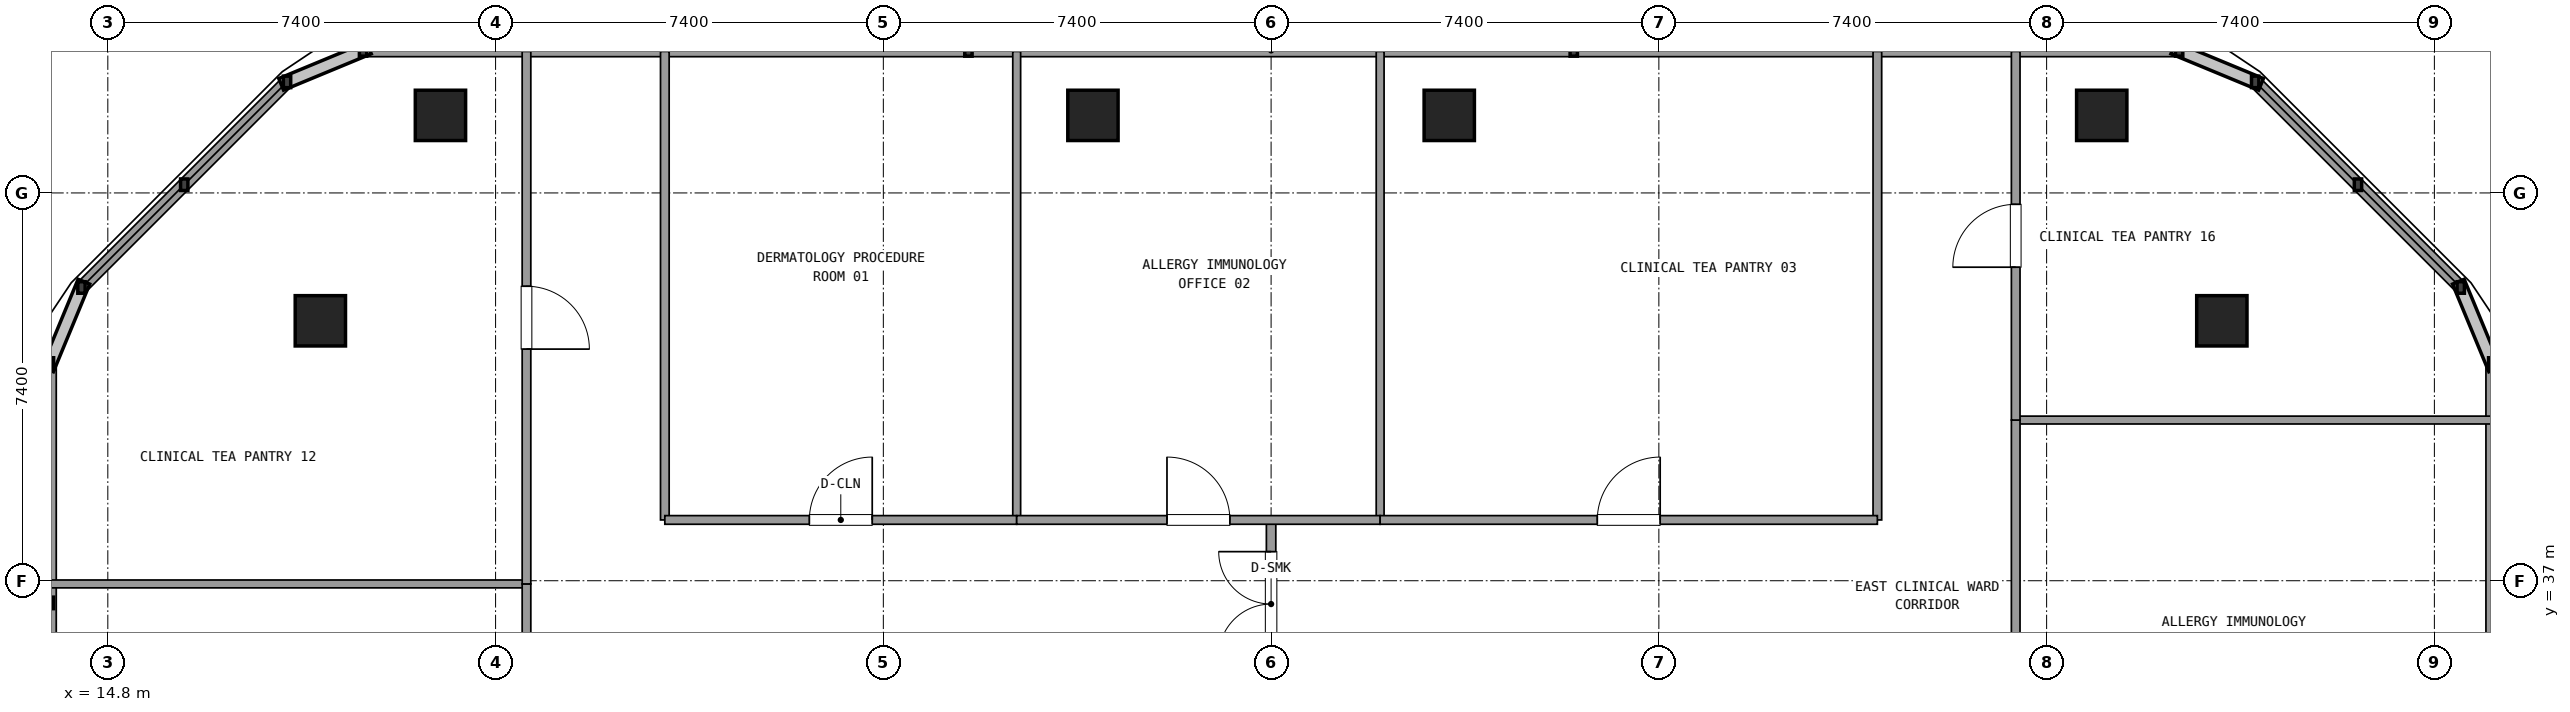
"""IFC4 building model, lengths in metres.
Left out: names, types, materials, properties, quantities, classifications, styles, units other than length and angle.
Written with IfcOpenShell. Run it as: python <this file> out.ifc"""

import sys

from ifc_helpers import new_model, si_unit, direction, frame, frame_2d, origin, origin_2d, place, context, subcontext, project, spatial, rectangle, extrude, element, fill, save


model = new_model("IFC4")
c1 = context("Model", 3, precision=1e-05, world=origin(), true_north=direction((0.0, 1.0)))
c2 = subcontext(c1, "Body", "Model", "MODEL_VIEW")
j1 = project(units=[si_unit("LENGTHUNIT", "METRE"), si_unit("PLANEANGLEUNIT", "RADIAN")], contexts=[c1])
p1 = place(None, origin())
s1 = spatial("IfcSite", under=j1, at=p1, CompositionType="ELEMENT")
p2 = place(p1, origin())
s2 = spatial("IfcBuilding", under=s1, at=p2, CompositionType="ELEMENT")
p3 = place(p2, frame((0.0, 0.0, 149.22)))
s3 = spatial("IfcBuildingStorey", under=s2, at=p3, CompositionType="ELEMENT", Elevation=149.22)
for number, where, z_axis, x_axis in (
    (1, (55.144, 41.96, 0.0), (0.0, 0.0, 1.0), (1.0, 0.0, 0.0)),
    (2, (52.852, 45.88, 0.0), (0.0, 0.0, 1.0), (1.0, 0.0, 0.0)),
    (3, (40.4, 45.88, 0.0), (0.0, 0.0, 1.0), (1.0, 0.0, 0.0)),
    (4, (33.6, 45.88, 0.0), (0.0, 0.0, 1.0), (1.0, 0.0, 0.0)),
    (5, (21.148, 45.88, 0.0), (0.0, 0.0, 1.0), (1.0, 0.0, 0.0)),
    (6, (18.856, 41.96, 0.0), (0.0, 0.0, 1.0), (1.0, 0.0, 0.0)),
):
    element("IfcColumn", number, at=place(p3, frame(where, z_axis=z_axis, x_axis=x_axis)), inside=s3, PredefinedType="COLUMN", context=c2, shape_type="SweptSolid", body=[
        extrude(rectangle(XDim=0.96, YDim=0.96, at=origin_2d()), origin(), (0.0, 0.0, 1.0), 3.6),
    ])
p4 = place(p3, frame((60.304, 10.655, 0.0), z_axis=(0.0, 0.0, 1.0), x_axis=(0.0, 1.0, 0.0)))
e7 = element("IfcWall", 7, at=p4, inside=s3, PredefinedType="SOLIDWALL", context=c2, shape_type="SweptSolid", body=[
    extrude(rectangle(XDim=30.49, YDim=0.24, at=frame_2d((15.245, 0.0))), origin(), (0.0, 0.0, 1.0), 0.85),
])
p5 = place(p3, frame((59.703, 42.596, 0.0), z_axis=(0.0, 0.0, 1.0), x_axis=(-0.707084777957, 0.707128783731, 0.0)))
e8 = element("IfcWall", 8, at=p5, inside=s3, PredefinedType="SOLIDWALL", context=c2, shape_type="SweptSolid", body=[
    extrude(rectangle(XDim=5.548, YDim=0.24, at=frame_2d((2.774, 0.0))), origin(), (0.0, 0.0, 1.0), 0.85),
])
p6 = place(p3, frame((54.329, 47.12, 0.0), z_axis=(0.0, 0.0, 1.0), x_axis=(-1.0, 0.0, 0.0)))
e9 = element("IfcWall", 9, at=p6, inside=s3, PredefinedType="SOLIDWALL", context=c2, shape_type="SweptSolid", body=[
    extrude(rectangle(XDim=34.658, YDim=0.24, at=frame_2d((17.329, 0.0))), origin(), (0.0, 0.0, 1.0), 0.85),
])
p7 = place(p3, frame((18.22, 46.519, 0.0), z_axis=(0.0, 0.0, 1.0), x_axis=(-0.707084777957, -0.707128783731, 0.0)))
e10 = element("IfcWall", 10, at=p7, inside=s3, PredefinedType="SOLIDWALL", context=c2, shape_type="SweptSolid", body=[
    extrude(rectangle(XDim=5.548, YDim=0.24, at=frame_2d((2.774, 0.0))), origin(), (0.0, 0.0, 1.0), 0.85),
])
p8 = place(p3, frame((13.696, 41.145, 0.0), z_axis=(0.0, 0.0, 1.0), x_axis=(0.0, -1.0, 0.0)))
e11 = element("IfcWall", 11, at=p8, inside=s3, PredefinedType="SOLIDWALL", context=c2, shape_type="SweptSolid", body=[
    extrude(rectangle(XDim=13.705, YDim=0.24, at=frame_2d((6.853, 0.0))), origin(), (0.0, 0.0, 1.0), 0.85),
])
p9 = place(p3, frame((37.0, 34.95, 0.0), z_axis=(0.0, 0.0, 1.0), x_axis=(0.0, 1.0, 0.0)))
e12 = element("IfcWall", 12, at=p9, inside=s3, PredefinedType="PARTITIONING", context=c2, shape_type="SweptSolid", body=[
    extrude(rectangle(XDim=3.21, YDim=0.18, at=frame_2d((1.605, 0.0))), origin(), (0.0, 0.0, 1.0), 2.61),
])
p10 = place(p9, frame((0.605, 0.0, 0.0)))
e13 = element("IfcOpeningElement", 13, at=p10, cuts=e12, PredefinedType="OPENING", context=c2, shape_type="SweptSolid", body=[
    extrude(rectangle(XDim=2.0, YDim=2.2, at=frame_2d((1.0, 1.1))), frame((0.0, 0.1, 0.0), z_axis=(0.0, -1.0, 0.0), x_axis=(1.0, 0.0, 0.0)), (0.0, 0.0, 1.0), 0.2),
])
for number, where, z_axis, x_axis in (
    (14, (25.43, 38.16, 0.0), (0.0, 0.0, 1.0), (0.0, 1.0, 0.0)),
    (15, (48.57, 38.16, 0.0), (0.0, 0.0, 1.0), (0.0, 1.0, 0.0)),
):
    element("IfcWall", number, at=place(p3, frame(where, z_axis=z_axis, x_axis=x_axis)), inside=s3, PredefinedType="PARTITIONING", context=c2, shape_type="SweptSolid", body=[
        extrude(rectangle(XDim=8.94, YDim=0.165, at=frame_2d((4.47, 0.0))), origin(), (0.0, 0.0, 1.0), 2.61),
    ])
p11 = place(p3, frame((32.145, 38.16, 0.0), z_axis=(0.0, 0.0, 1.0), x_axis=(0.0, 1.0, 0.0)))
e16 = element("IfcWall", 16, at=p11, inside=s3, PredefinedType="PARTITIONING", context=c2, shape_type="SweptSolid", body=[
    extrude(rectangle(XDim=8.94, YDim=0.15, at=frame_2d((4.47, 0.0))), origin(), (0.0, 0.0, 1.0), 2.61),
])
p12 = place(p3, frame((25.43, 38.16, 0.0), z_axis=(0.0, 0.0, 1.0), x_axis=(1.0, 0.0, 0.0)))
e17 = element("IfcWall", 17, at=p12, inside=s3, PredefinedType="PARTITIONING", context=c2, shape_type="SweptSolid", body=[
    extrude(rectangle(XDim=6.715, YDim=0.165, at=frame_2d((3.357, 0.0))), origin(), (0.0, 0.0, 1.0), 2.61),
])
p13 = place(p12, frame((2.758, 0.0, 0.0)))
e18 = element("IfcOpeningElement", 18, at=p13, cuts=e17, PredefinedType="OPENING", context=c2, shape_type="SweptSolid", body=[
    extrude(rectangle(XDim=1.2, YDim=2.15, at=frame_2d((0.6, 1.075))), frame((0.0, 0.093, 0.0), z_axis=(0.0, -1.0, 0.0), x_axis=(1.0, 0.0, 0.0)), (0.0, 0.0, 1.0), 0.185),
])
p14 = place(p3, frame((39.081, 38.16, 0.0), z_axis=(0.0, 0.0, 1.0), x_axis=(0.0, 1.0, 0.0)))
e19 = element("IfcWall", 19, at=p14, inside=s3, PredefinedType="PARTITIONING", context=c2, shape_type="SweptSolid", body=[
    extrude(rectangle(XDim=8.94, YDim=0.15, at=frame_2d((4.47, 0.0))), origin(), (0.0, 0.0, 1.0), 2.61),
])
p15 = place(p3, frame((32.145, 38.16, 0.0), z_axis=(0.0, 0.0, 1.0), x_axis=(1.0, 0.0, 0.0)))
e20 = element("IfcWall", 20, at=p15, inside=s3, PredefinedType="PARTITIONING", context=c2, shape_type="SweptSolid", body=[
    extrude(rectangle(XDim=6.936, YDim=0.165, at=frame_2d((3.468, 0.0))), origin(), (0.0, 0.0, 1.0), 2.61),
])
p16 = place(p15, frame((2.868, 0.0, 0.0)))
e21 = element("IfcOpeningElement", 21, at=p16, cuts=e20, PredefinedType="OPENING", context=c2, shape_type="SweptSolid", body=[
    extrude(rectangle(XDim=1.2, YDim=2.15, at=frame_2d((0.6, 1.075))), frame((0.0, 0.093, 0.0), z_axis=(0.0, -1.0, 0.0), x_axis=(1.0, 0.0, 0.0)), (0.0, 0.0, 1.0), 0.185),
])
p17 = place(p3, frame((39.081, 38.16, 0.0), z_axis=(0.0, 0.0, 1.0), x_axis=(1.0, 0.0, 0.0)))
e22 = element("IfcWall", 22, at=p17, inside=s3, PredefinedType="PARTITIONING", context=c2, shape_type="SweptSolid", body=[
    extrude(rectangle(XDim=9.489, YDim=0.165, at=frame_2d((4.745, 0.0))), origin(), (0.0, 0.0, 1.0), 2.61),
])
p18 = place(p17, frame((4.144, 0.0, 0.0)))
e23 = element("IfcOpeningElement", 23, at=p18, cuts=e22, PredefinedType="OPENING", context=c2, shape_type="SweptSolid", body=[
    extrude(rectangle(XDim=1.2, YDim=2.15, at=frame_2d((0.6, 1.075))), frame((0.0, 0.093, 0.0), z_axis=(0.0, -1.0, 0.0), x_axis=(1.0, 0.0, 0.0)), (0.0, 0.0, 1.0), 0.185),
])
p19 = place(p3, frame((22.79, 36.939, 0.0), z_axis=(0.0, 0.0, 1.0), x_axis=(-1.0, 0.0, 0.0)))
e24 = element("IfcWall", 24, at=p19, inside=s3, PredefinedType="PARTITIONING", context=c2, shape_type="SweptSolid", body=[
    extrude(rectangle(XDim=9.074, YDim=0.15, at=frame_2d((4.537, 0.0))), origin(), (0.0, 0.0, 1.0), 2.61),
])
p20 = place(p3, frame((22.79, 27.56, 0.0), z_axis=(0.0, 0.0, 1.0), x_axis=(0.0, 1.0, 0.0)))
e25 = element("IfcWall", 25, at=p20, inside=s3, PredefinedType="PARTITIONING", context=c2, shape_type="SweptSolid", body=[
    extrude(rectangle(XDim=9.379, YDim=0.165, at=frame_2d((4.689, 0.0))), origin(), (0.0, 0.0, 1.0), 2.61),
])
p21 = place(p20, frame((4.09, 0.0, 0.0)))
e26 = element("IfcOpeningElement", 26, at=p21, cuts=e25, PredefinedType="OPENING", context=c2, shape_type="SweptSolid", body=[
    extrude(rectangle(XDim=1.2, YDim=2.15, at=frame_2d((0.6, 1.075))), frame((0.0, 0.093, 0.0), z_axis=(0.0, -1.0, 0.0), x_axis=(1.0, 0.0, 0.0)), (0.0, 0.0, 1.0), 0.185),
])
p22 = place(p3, frame((22.79, 36.939, 0.0), z_axis=(0.0, 0.0, 1.0), x_axis=(0.0, 1.0, 0.0)))
e27 = element("IfcWall", 27, at=p22, inside=s3, PredefinedType="PARTITIONING", context=c2, shape_type="SweptSolid", body=[
    extrude(rectangle(XDim=10.161, YDim=0.165, at=frame_2d((5.081, 0.0))), origin(), (0.0, 0.0, 1.0), 2.61),
])
p23 = place(p22, frame((4.481, 0.0, 0.0)))
e28 = element("IfcOpeningElement", 28, at=p23, cuts=e27, PredefinedType="OPENING", context=c2, shape_type="SweptSolid", body=[
    extrude(rectangle(XDim=1.2, YDim=2.15, at=frame_2d((0.6, 1.075))), frame((0.0, 0.093, 0.0), z_axis=(0.0, -1.0, 0.0), x_axis=(1.0, 0.0, 0.0)), (0.0, 0.0, 1.0), 0.185),
])
p24 = place(p3, frame((51.21, 40.066, 0.0), z_axis=(0.0, 0.0, 1.0), x_axis=(1.0, 0.0, 0.0)))
e29 = element("IfcWall", 29, at=p24, inside=s3, PredefinedType="PARTITIONING", context=c2, shape_type="SweptSolid", body=[
    extrude(rectangle(XDim=9.074, YDim=0.15, at=frame_2d((4.537, 0.0))), origin(), (0.0, 0.0, 1.0), 2.61),
])
p25 = place(p3, frame((51.21, 27.56, 0.0), z_axis=(0.0, 0.0, 1.0), x_axis=(0.0, 1.0, 0.0)))
e30 = element("IfcWall", 30, at=p25, inside=s3, PredefinedType="PARTITIONING", context=c2, shape_type="SweptSolid", body=[
    extrude(rectangle(XDim=12.506, YDim=0.165, at=frame_2d((6.253, 0.0))), origin(), (0.0, 0.0, 1.0), 2.61),
])
p26 = place(p25, frame((5.653, 0.0, 0.0)))
e31 = element("IfcOpeningElement", 31, at=p26, cuts=e30, PredefinedType="OPENING", context=c2, shape_type="SweptSolid", body=[
    extrude(rectangle(XDim=1.2, YDim=2.15, at=frame_2d((0.6, 1.075))), frame((0.0, 0.093, 0.0), z_axis=(0.0, -1.0, 0.0), x_axis=(1.0, 0.0, 0.0)), (0.0, 0.0, 1.0), 0.185),
])
p27 = place(p3, frame((51.21, 40.066, 0.0), z_axis=(0.0, 0.0, 1.0), x_axis=(0.0, 1.0, 0.0)))
e32 = element("IfcWall", 32, at=p27, inside=s3, PredefinedType="PARTITIONING", context=c2, shape_type="SweptSolid", body=[
    extrude(rectangle(XDim=7.034, YDim=0.165, at=frame_2d((3.517, 0.0))), origin(), (0.0, 0.0, 1.0), 2.61),
])
p28 = place(p27, frame((2.917, 0.0, 0.0)))
e33 = element("IfcOpeningElement", 33, at=p28, cuts=e32, PredefinedType="OPENING", context=c2, shape_type="SweptSolid", body=[
    extrude(rectangle(XDim=1.2, YDim=2.15, at=frame_2d((0.6, 1.075))), frame((0.0, 0.093, 0.0), z_axis=(0.0, -1.0, 0.0), x_axis=(1.0, 0.0, 0.0)), (0.0, 0.0, 1.0), 0.185),
])
p29 = place(p10, origin())
e34 = element("IfcDoor", 34, at=p29, inside=s3, OperationType="DOUBLE_DOOR_SINGLE_SWING", PredefinedType="DOOR", context=c2, shape_type="SweptSolid", body=[
    extrude(rectangle(XDim=2.0, YDim=2.2, at=frame_2d((1.0, 1.1))), frame((0.0, 0.025, 0.0), z_axis=(0.0, -1.0, 0.0), x_axis=(1.0, 0.0, 0.0)), (0.0, 0.0, 1.0), 0.05),
])
fill(e13, e34)
p30 = place(p13, origin())
e35 = element("IfcDoor", 35, at=p30, inside=s3, OperationType="SINGLE_SWING_RIGHT", PredefinedType="DOOR", context=c2, shape_type="SweptSolid", body=[
    extrude(rectangle(XDim=1.2, YDim=2.15, at=frame_2d((0.6, 1.075))), frame((0.0, 0.025, 0.0), z_axis=(0.0, -1.0, 0.0), x_axis=(1.0, 0.0, 0.0)), (0.0, 0.0, 1.0), 0.05),
])
fill(e18, e35)
p31 = place(p16, origin())
e36 = element("IfcDoor", 36, at=p31, inside=s3, OperationType="SINGLE_SWING_LEFT", PredefinedType="DOOR", context=c2, shape_type="SweptSolid", body=[
    extrude(rectangle(XDim=1.2, YDim=2.15, at=frame_2d((0.6, 1.075))), frame((0.0, 0.025, 0.0), z_axis=(0.0, -1.0, 0.0), x_axis=(1.0, 0.0, 0.0)), (0.0, 0.0, 1.0), 0.05),
])
fill(e21, e36)
p32 = place(p18, origin())
e37 = element("IfcDoor", 37, at=p32, inside=s3, OperationType="SINGLE_SWING_RIGHT", PredefinedType="DOOR", context=c2, shape_type="SweptSolid", body=[
    extrude(rectangle(XDim=1.2, YDim=2.15, at=frame_2d((0.6, 1.075))), frame((0.0, 0.025, 0.0), z_axis=(0.0, -1.0, 0.0), x_axis=(1.0, 0.0, 0.0)), (0.0, 0.0, 1.0), 0.05),
])
fill(e23, e37)
p33 = place(p23, frame((1.2, 0.0, 0.0), z_axis=(0.0, 0.0, 1.0), x_axis=(-1.0, 0.0, 0.0)))
e38 = element("IfcDoor", 38, at=p33, inside=s3, OperationType="SINGLE_SWING_LEFT", PredefinedType="DOOR", context=c2, shape_type="SweptSolid", body=[
    extrude(rectangle(XDim=1.2, YDim=2.15, at=frame_2d((0.6, 1.075))), frame((0.0, 0.025, 0.0), z_axis=(0.0, -1.0, 0.0), x_axis=(1.0, 0.0, 0.0)), (0.0, 0.0, 1.0), 0.05),
])
fill(e28, e38)
p34 = place(p28, origin())
e39 = element("IfcDoor", 39, at=p34, inside=s3, OperationType="SINGLE_SWING_LEFT", PredefinedType="DOOR", context=c2, shape_type="SweptSolid", body=[
    extrude(rectangle(XDim=1.2, YDim=2.15, at=frame_2d((0.6, 1.075))), frame((0.0, 0.025, 0.0), z_axis=(0.0, -1.0, 0.0), x_axis=(1.0, 0.0, 0.0)), (0.0, 0.0, 1.0), 0.05),
])
fill(e33, e39)
save(model, sys.argv[1])
